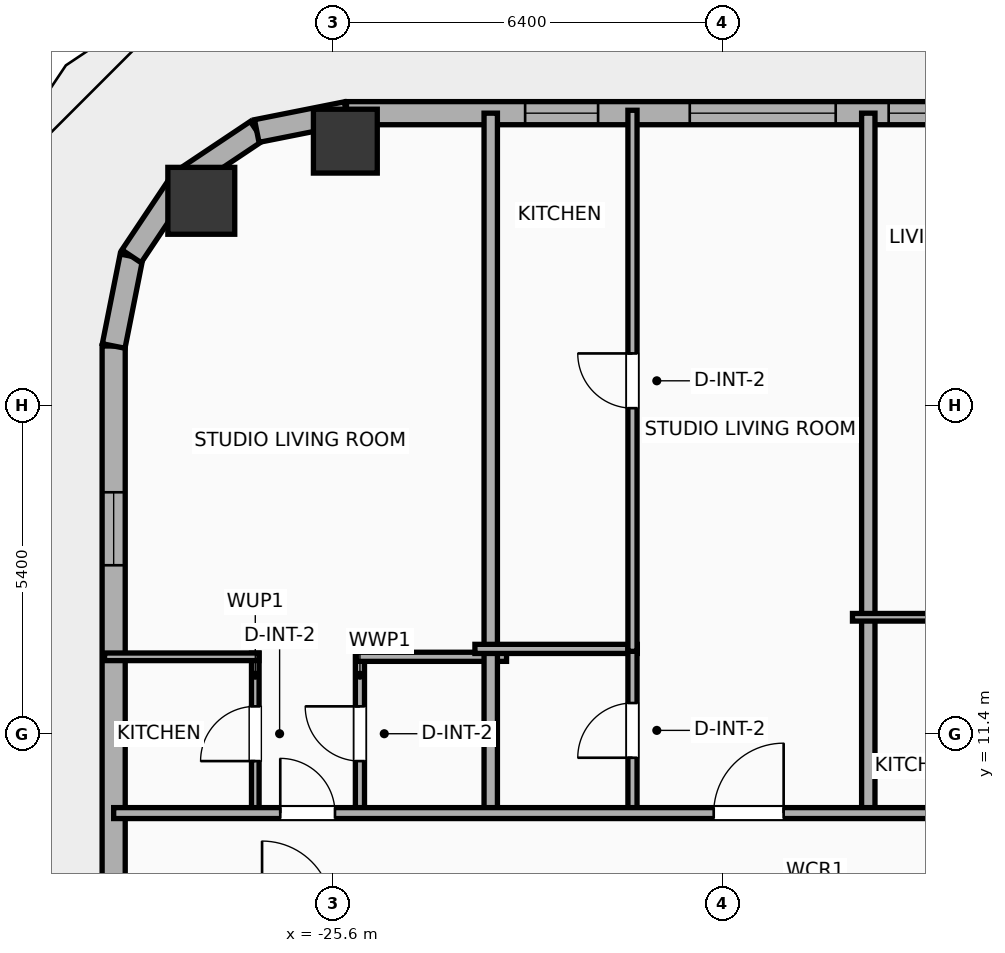
"""IFC4 building model, lengths in metres.
Left out: names, types, materials, properties, quantities, classifications, styles, units other than length and angle.
Written with IfcOpenShell. Run it as: python <this file> out.ifc"""

import sys

from ifc_helpers import new_model, si_unit, direction, frame, frame_2d, origin, origin_2d, place, context, subcontext, project, spatial, rectangle, hollow_rectangle, hollow_circle, extrude, element, fill, save


model = new_model("IFC4")
c1 = context("Model", 3, precision=1e-05, world=origin(), true_north=direction((0.0, 1.0)))
c2 = subcontext(c1, "Body", "Model", "MODEL_VIEW")
j1 = project(units=[si_unit("LENGTHUNIT", "METRE"), si_unit("PLANEANGLEUNIT", "RADIAN")], contexts=[c1])
p1 = place(None, origin())
s1 = spatial("IfcSite", under=j1, at=p1, CompositionType="ELEMENT")
p2 = place(p1, origin())
s2 = spatial("IfcBuilding", under=s1, at=p2, CompositionType="ELEMENT")
p3 = place(p2, frame((0.0, 0.0, 113.1)))
s3 = spatial("IfcBuildingStorey", under=s2, at=p3, CompositionType="ELEMENT", Elevation=113.1)
p4 = place(p3, frame((-25.4, 21.15, 0.0), z_axis=(0.0, 0.0, 1.0), x_axis=(1.0, 0.0, 0.0)))
e1 = element("IfcColumn", 1, at=p4, inside=s3, PredefinedType="COLUMN", context=c2, shape_type="SweptSolid", body=[
    extrude(hollow_rectangle(XDim=1.05, YDim=1.05, WallThickness=0.036, at=origin_2d()), origin(), (0.0, 0.0, 1.0), 3.9),
])
p5 = place(p3, frame((-27.769, 20.169, 0.0), z_axis=(0.0, 0.0, 1.0), x_axis=(1.0, 0.0, 0.0)))
e2 = element("IfcColumn", 2, at=p5, inside=s3, PredefinedType="COLUMN", context=c2, shape_type="SweptSolid", body=[
    extrude(hollow_circle(Radius=0.55, WallThickness=0.036, at=origin_2d()), origin(), (0.0, 0.0, 1.0), 3.9),
])
p6 = place(p3, frame((-29.21, -16.581, 0.0), z_axis=(0.0, 0.0, 1.0), x_axis=(0.0, 1.0, 0.0)))
e3 = element("IfcWall", 3, at=p6, inside=s3, PredefinedType="ELEMENTEDWALL", context=c2, shape_type="SweptSolid", body=[
    extrude(rectangle(XDim=34.363, YDim=0.38, at=frame_2d((17.181, 0.0))), origin(), (0.0, 0.0, 1.0), 3.65),
])
p7 = place(p6, frame((30.757, 0.0, 0.75)))
e4 = element("IfcOpeningElement", 4, at=p7, cuts=e3, PredefinedType="OPENING", context=c2, shape_type="SweptSolid", body=[
    extrude(rectangle(XDim=1.2, YDim=2.05, at=frame_2d((0.6, 1.025))), frame((0.0, 0.2, 0.0), z_axis=(0.0, -1.0, 0.0), x_axis=(1.0, 0.0, 0.0)), (0.0, 0.0, 1.0), 0.4),
])
p8 = place(p6, frame((20.326, 0.0, 0.75)))
e5 = element("IfcOpeningElement", 5, at=p8, cuts=e3, PredefinedType="OPENING", context=c2, shape_type="SweptSolid", body=[
    extrude(rectangle(XDim=1.2, YDim=2.05, at=frame_2d((0.6, 1.025))), frame((0.0, 0.2, 0.0), z_axis=(0.0, -1.0, 0.0), x_axis=(1.0, 0.0, 0.0)), (0.0, 0.0, 1.0), 0.4),
])
p9 = place(p6, frame((11.776, 0.0, 0.75)))
e6 = element("IfcOpeningElement", 6, at=p9, cuts=e3, PredefinedType="OPENING", context=c2, shape_type="SweptSolid", body=[
    extrude(rectangle(XDim=1.2, YDim=2.05, at=frame_2d((0.6, 1.025))), frame((0.0, 0.2, 0.0), z_axis=(0.0, -1.0, 0.0), x_axis=(1.0, 0.0, 0.0)), (0.0, 0.0, 1.0), 0.4),
])
p10 = place(p3, frame((-29.21, 17.781, 0.0), z_axis=(0.0, 0.0, 1.0), x_axis=(0.195086038585, 0.980786132421, 0.0)))
e7 = element("IfcWall", 7, at=p10, inside=s3, PredefinedType="ELEMENTEDWALL", context=c2, shape_type="SweptSolid", body=[
    extrude(rectangle(XDim=1.504, YDim=0.38, at=frame_2d((0.752, 0.0))), origin(), (0.0, 0.0, 1.0), 3.65),
])
p11 = place(p3, frame((-28.917, 19.257, 0.0), z_axis=(0.0, 0.0, 1.0), x_axis=(0.555610286119, 0.831442848281, 0.0)))
e8 = element("IfcWall", 8, at=p11, inside=s3, PredefinedType="ELEMENTEDWALL", context=c2, shape_type="SweptSolid", body=[
    extrude(rectangle(XDim=1.485, YDim=0.38, at=frame_2d((0.743, 0.0))), origin(), (0.0, 0.0, 1.0), 3.65),
])
p12 = place(p3, frame((-28.091, 20.491, 0.0), z_axis=(0.0, 0.0, 1.0), x_axis=(0.831468045563, 0.555572577804, 0.0)))
e9 = element("IfcWall", 9, at=p12, inside=s3, PredefinedType="ELEMENTEDWALL", context=c2, shape_type="SweptSolid", body=[
    extrude(rectangle(XDim=1.485, YDim=0.38, at=frame_2d((0.742, 0.0))), origin(), (0.0, 0.0, 1.0), 3.65),
])
p13 = place(p3, frame((-26.857, 21.316, 0.0), z_axis=(0.0, 0.0, 1.0), x_axis=(0.980755066645, 0.195242155415, 0.0)))
e10 = element("IfcWall", 10, at=p13, inside=s3, PredefinedType="ELEMENTEDWALL", context=c2, shape_type="SweptSolid", body=[
    extrude(rectangle(XDim=1.504, YDim=0.38, at=frame_2d((0.752, 0.0))), origin(), (0.0, 0.0, 1.0), 3.65),
])
p14 = place(p3, frame((-25.381, 21.61, 0.0), z_axis=(0.0, 0.0, 1.0), x_axis=(1.0, 0.0, 0.0)))
e11 = element("IfcWall", 11, at=p14, inside=s3, PredefinedType="ELEMENTEDWALL", context=c2, shape_type="SweptSolid", body=[
    extrude(rectangle(XDim=54.763, YDim=0.38, at=frame_2d((27.381, 0.0))), origin(), (0.0, 0.0, 1.0), 3.65),
])
p15 = place(p14, frame((5.645, 0.0, 0.75)))
e12 = element("IfcOpeningElement", 12, at=p15, cuts=e11, PredefinedType="OPENING", context=c2, shape_type="SweptSolid", body=[
    extrude(rectangle(XDim=2.4, YDim=2.1, at=frame_2d((1.2, 1.05))), frame((0.0, 0.2, 0.0), z_axis=(0.0, -1.0, 0.0), x_axis=(1.0, 0.0, 0.0)), (0.0, 0.0, 1.0), 0.4),
])
p16 = place(p14, frame((34.677, 0.0, 0.75)))
e13 = element("IfcOpeningElement", 13, at=p16, cuts=e11, PredefinedType="OPENING", context=c2, shape_type="SweptSolid", body=[
    extrude(rectangle(XDim=2.4, YDim=2.1, at=frame_2d((1.2, 1.05))), frame((0.0, 0.2, 0.0), z_axis=(0.0, -1.0, 0.0), x_axis=(1.0, 0.0, 0.0)), (0.0, 0.0, 1.0), 0.4),
])
p17 = place(p14, frame((45.067, 0.0, 0.75)))
e14 = element("IfcOpeningElement", 14, at=p17, cuts=e11, PredefinedType="OPENING", context=c2, shape_type="SweptSolid", body=[
    extrude(rectangle(XDim=2.4, YDim=2.1, at=frame_2d((1.2, 1.05))), frame((0.0, 0.2, 0.0), z_axis=(0.0, -1.0, 0.0), x_axis=(1.0, 0.0, 0.0)), (0.0, 0.0, 1.0), 0.4),
])
p18 = place(p14, frame((2.938, 0.0, 0.75)))
e15 = element("IfcOpeningElement", 15, at=p18, cuts=e11, PredefinedType="OPENING", context=c2, shape_type="SweptSolid", body=[
    extrude(rectangle(XDim=1.2, YDim=2.05, at=frame_2d((0.6, 1.025))), frame((0.0, 0.2, 0.0), z_axis=(0.0, -1.0, 0.0), x_axis=(1.0, 0.0, 0.0)), (0.0, 0.0, 1.0), 0.4),
])
p19 = place(p14, frame((8.916, 0.0, 0.75)))
e16 = element("IfcOpeningElement", 16, at=p19, cuts=e11, PredefinedType="OPENING", context=c2, shape_type="SweptSolid", body=[
    extrude(rectangle(XDim=1.2, YDim=2.05, at=frame_2d((0.6, 1.025))), frame((0.0, 0.2, 0.0), z_axis=(0.0, -1.0, 0.0), x_axis=(1.0, 0.0, 0.0)), (0.0, 0.0, 1.0), 0.4),
])
p20 = place(p14, frame((13.476, 0.0, 0.75)))
e17 = element("IfcOpeningElement", 17, at=p20, cuts=e11, PredefinedType="OPENING", context=c2, shape_type="SweptSolid", body=[
    extrude(rectangle(XDim=1.2, YDim=2.05, at=frame_2d((0.6, 1.025))), frame((0.0, 0.2, 0.0), z_axis=(0.0, -1.0, 0.0), x_axis=(1.0, 0.0, 0.0)), (0.0, 0.0, 1.0), 0.4),
])
p21 = place(p14, frame((17.076, 0.0, 0.75)))
e18 = element("IfcOpeningElement", 18, at=p21, cuts=e11, PredefinedType="OPENING", context=c2, shape_type="SweptSolid", body=[
    extrude(rectangle(XDim=1.2, YDim=2.05, at=frame_2d((0.6, 1.025))), frame((0.0, 0.2, 0.0), z_axis=(0.0, -1.0, 0.0), x_axis=(1.0, 0.0, 0.0)), (0.0, 0.0, 1.0), 0.4),
])
p22 = place(p14, frame((19.956, 0.0, 0.75)))
e19 = element("IfcOpeningElement", 19, at=p22, cuts=e11, PredefinedType="OPENING", context=c2, shape_type="SweptSolid", body=[
    extrude(rectangle(XDim=1.2, YDim=2.05, at=frame_2d((0.6, 1.025))), frame((0.0, 0.2, 0.0), z_axis=(0.0, -1.0, 0.0), x_axis=(1.0, 0.0, 0.0)), (0.0, 0.0, 1.0), 0.4),
])
p23 = place(p14, frame((24.276, 0.0, 0.75)))
e20 = element("IfcOpeningElement", 20, at=p23, cuts=e11, PredefinedType="OPENING", context=c2, shape_type="SweptSolid", body=[
    extrude(rectangle(XDim=1.2, YDim=2.05, at=frame_2d((0.6, 1.025))), frame((0.0, 0.2, 0.0), z_axis=(0.0, -1.0, 0.0), x_axis=(1.0, 0.0, 0.0)), (0.0, 0.0, 1.0), 0.4),
])
p24 = place(p14, frame((27.876, 0.0, 0.75)))
e21 = element("IfcOpeningElement", 21, at=p24, cuts=e11, PredefinedType="OPENING", context=c2, shape_type="SweptSolid", body=[
    extrude(rectangle(XDim=1.2, YDim=2.05, at=frame_2d((0.6, 1.025))), frame((0.0, 0.2, 0.0), z_axis=(0.0, -1.0, 0.0), x_axis=(1.0, 0.0, 0.0)), (0.0, 0.0, 1.0), 0.4),
])
p25 = place(p14, frame((30.876, 0.0, 0.75)))
e22 = element("IfcOpeningElement", 22, at=p25, cuts=e11, PredefinedType="OPENING", context=c2, shape_type="SweptSolid", body=[
    extrude(rectangle(XDim=1.2, YDim=2.05, at=frame_2d((0.6, 1.025))), frame((0.0, 0.2, 0.0), z_axis=(0.0, -1.0, 0.0), x_axis=(1.0, 0.0, 0.0)), (0.0, 0.0, 1.0), 0.4),
])
p26 = place(p14, frame((38.676, 0.0, 0.75)))
e23 = element("IfcOpeningElement", 23, at=p26, cuts=e11, PredefinedType="OPENING", context=c2, shape_type="SweptSolid", body=[
    extrude(rectangle(XDim=1.2, YDim=2.05, at=frame_2d((0.6, 1.025))), frame((0.0, 0.2, 0.0), z_axis=(0.0, -1.0, 0.0), x_axis=(1.0, 0.0, 0.0)), (0.0, 0.0, 1.0), 0.4),
])
p27 = place(p14, frame((41.796, 0.0, 0.75)))
e24 = element("IfcOpeningElement", 24, at=p27, cuts=e11, PredefinedType="OPENING", context=c2, shape_type="SweptSolid", body=[
    extrude(rectangle(XDim=1.2, YDim=2.05, at=frame_2d((0.6, 1.025))), frame((0.0, 0.2, 0.0), z_axis=(0.0, -1.0, 0.0), x_axis=(1.0, 0.0, 0.0)), (0.0, 0.0, 1.0), 0.4),
])
p28 = place(p14, frame((49.476, 0.0, 0.75)))
e25 = element("IfcOpeningElement", 25, at=p28, cuts=e11, PredefinedType="OPENING", context=c2, shape_type="SweptSolid", body=[
    extrude(rectangle(XDim=1.2, YDim=2.05, at=frame_2d((0.6, 1.025))), frame((0.0, 0.2, 0.0), z_axis=(0.0, -1.0, 0.0), x_axis=(1.0, 0.0, 0.0)), (0.0, 0.0, 1.0), 0.4),
])
p29 = place(p14, frame((52.227, 0.0, 0.75)))
e26 = element("IfcOpeningElement", 26, at=p29, cuts=e11, PredefinedType="OPENING", context=c2, shape_type="SweptSolid", body=[
    extrude(rectangle(XDim=1.2, YDim=2.05, at=frame_2d((0.6, 1.025))), frame((0.0, 0.2, 0.0), z_axis=(0.0, -1.0, 0.0), x_axis=(1.0, 0.0, 0.0)), (0.0, 0.0, 1.0), 0.4),
])
p30 = place(p3, frame((-26.881, 10.08, 0.0), z_axis=(0.0, 0.0, 1.0), x_axis=(0.0, 1.0, 0.0)))
e27 = element("IfcWall", 27, at=p30, inside=s3, PredefinedType="PARTITIONING", context=c2, shape_type="SweptSolid", body=[
    extrude(rectangle(XDim=2.65, YDim=0.125, at=frame_2d((1.325, 0.0))), origin(), (0.0, 0.0, 1.0), 3.65),
])
p31 = place(p30, frame((0.875, 0.0, 0.0)))
e28 = element("IfcOpeningElement", 28, at=p31, cuts=e27, PredefinedType="OPENING", context=c2, shape_type="SweptSolid", body=[
    extrude(rectangle(XDim=0.9, YDim=2.05, at=frame_2d((0.45, 1.025))), frame((0.0, 0.073, 0.0), z_axis=(0.0, -1.0, 0.0), x_axis=(1.0, 0.0, 0.0)), (0.0, 0.0, 1.0), 0.145),
])
p32 = place(p3, frame((-25.16, 10.08, 0.0), z_axis=(0.0, 0.0, 1.0), x_axis=(0.0, 1.0, 0.0)))
e29 = element("IfcWall", 29, at=p32, inside=s3, PredefinedType="PLUMBINGWALL", context=c2, shape_type="SweptSolid", body=[
    extrude(rectangle(XDim=2.65, YDim=0.15, at=frame_2d((1.325, 0.0))), origin(), (0.0, 0.0, 1.0), 3.65),
])
p33 = place(p32, frame((0.875, 0.0, 0.0)))
e30 = element("IfcOpeningElement", 30, at=p33, cuts=e29, PredefinedType="OPENING", context=c2, shape_type="SweptSolid", body=[
    extrude(rectangle(XDim=0.9, YDim=2.05, at=frame_2d((0.45, 1.025))), frame((0.0, 0.085, 0.0), z_axis=(0.0, -1.0, 0.0), x_axis=(1.0, 0.0, 0.0)), (0.0, 0.0, 1.0), 0.17),
])
p34 = place(p3, frame((-29.36, 12.67, 0.0), z_axis=(0.0, 0.0, 1.0), x_axis=(1.0, 0.0, 0.0)))
e31 = element("IfcWall", 31, at=p34, inside=s3, PredefinedType="PARTITIONING", context=c2, shape_type="SweptSolid", body=[
    extrude(rectangle(XDim=2.539, YDim=0.125, at=frame_2d((1.27, 0.0))), origin(), (0.0, 0.0, 1.0), 3.65),
])
p35 = place(p3, frame((-25.22, 12.67, 0.0), z_axis=(0.0, 0.0, 1.0), x_axis=(1.0, 0.0, 0.0)))
e32 = element("IfcWall", 32, at=p35, inside=s3, PredefinedType="PLUMBINGWALL", context=c2, shape_type="SweptSolid", body=[
    extrude(rectangle(XDim=2.471, YDim=0.15, at=frame_2d((1.235, 0.0))), origin(), (0.0, 0.0, 1.0), 3.65),
])
p36 = place(p3, frame((-23.009, 10.02, 0.0), z_axis=(0.0, 0.0, 1.0), x_axis=(0.0, 1.0, 0.0)))
e33 = element("IfcWall", 33, at=p36, inside=s3, PredefinedType="PARTITIONING", context=c2, shape_type="SweptSolid", body=[
    extrude(rectangle(XDim=11.59, YDim=0.22, at=frame_2d((5.795, 0.0))), origin(), (0.0, 0.0, 1.0), 3.65),
])
p37 = place(p3, frame((-23.269, 12.8, 0.0), z_axis=(0.0, 0.0, 1.0), x_axis=(1.0, 0.0, 0.0)))
e34 = element("IfcWall", 34, at=p37, inside=s3, PredefinedType="PLUMBINGWALL", context=c2, shape_type="SweptSolid", body=[
    extrude(rectangle(XDim=2.671, YDim=0.15, at=frame_2d((1.335, 0.0))), origin(), (0.0, 0.0, 1.0), 3.65),
])
p38 = place(p3, frame((-20.678, 10.08, 0.0), z_axis=(0.0, 0.0, 1.0), x_axis=(0.0, 1.0, 0.0)))
e35 = element("IfcWall", 35, at=p38, inside=s3, PredefinedType="PLUMBINGWALL", context=c2, shape_type="SweptSolid", body=[
    extrude(rectangle(XDim=2.76, YDim=0.15, at=frame_2d((1.38, 0.0))), origin(), (0.0, 0.0, 1.0), 3.65),
])
p39 = place(p38, frame((0.93, 0.0, 0.0)))
e36 = element("IfcOpeningElement", 36, at=p39, cuts=e35, PredefinedType="OPENING", context=c2, shape_type="SweptSolid", body=[
    extrude(rectangle(XDim=0.9, YDim=2.05, at=frame_2d((0.45, 1.025))), frame((0.0, 0.085, 0.0), z_axis=(0.0, -1.0, 0.0), x_axis=(1.0, 0.0, 0.0)), (0.0, 0.0, 1.0), 0.17),
])
p40 = place(p3, frame((-20.678, 12.76, 0.0), z_axis=(0.0, 0.0, 1.0), x_axis=(0.0, 1.0, 0.0)))
e37 = element("IfcWall", 37, at=p40, inside=s3, PredefinedType="PLUMBINGWALL", context=c2, shape_type="SweptSolid", body=[
    extrude(rectangle(XDim=8.898, YDim=0.15, at=frame_2d((4.449, 0.0))), origin(), (0.0, 0.0, 1.0), 3.65),
])
p41 = place(p40, frame((3.999, 0.0, 0.0)))
e38 = element("IfcOpeningElement", 38, at=p41, cuts=e37, PredefinedType="OPENING", context=c2, shape_type="SweptSolid", body=[
    extrude(rectangle(XDim=0.9, YDim=2.05, at=frame_2d((0.45, 1.025))), frame((0.0, 0.085, 0.0), z_axis=(0.0, -1.0, 0.0), x_axis=(1.0, 0.0, 0.0)), (0.0, 0.0, 1.0), 0.17),
])
p42 = place(p3, frame((-16.8, 10.02, 0.0), z_axis=(0.0, 0.0, 1.0), x_axis=(0.0, 1.0, 0.0)))
e39 = element("IfcWall", 39, at=p42, inside=s3, PredefinedType="PARTITIONING", context=c2, shape_type="SweptSolid", body=[
    extrude(rectangle(XDim=11.59, YDim=0.22, at=frame_2d((5.795, 0.0))), origin(), (0.0, 0.0, 1.0), 3.65),
])
p43 = place(p3, frame((-17.06, 13.32, 0.0), z_axis=(0.0, 0.0, 1.0), x_axis=(1.0, 0.0, 0.0)))
e40 = element("IfcWall", 40, at=p43, inside=s3, PredefinedType="PARTITIONING", context=c2, shape_type="SweptSolid", body=[
    extrude(rectangle(XDim=2.69, YDim=0.125, at=frame_2d((1.345, 0.0))), origin(), (0.0, 0.0, 1.0), 3.65),
])
p44 = place(p3, frame((-29.21, 10.1, 0.0), z_axis=(0.0, 0.0, 1.0), x_axis=(1.0, 0.0, 0.0)))
e41 = element("IfcWall", 41, at=p44, inside=s3, PredefinedType="PARTITIONING", context=c2, shape_type="SweptSolid", body=[
    extrude(rectangle(XDim=62.42, YDim=0.18, at=frame_2d((31.21, 0.0))), origin(), (0.0, 0.0, 1.0), 3.65),
])
p45 = place(p44, frame((2.74, 0.0, 0.0)))
e42 = element("IfcOpeningElement", 42, at=p45, cuts=e41, PredefinedType="OPENING", context=c2, shape_type="SweptSolid", body=[
    extrude(rectangle(XDim=0.9, YDim=2.05, at=frame_2d((0.45, 1.025))), frame((0.0, 0.1, 0.0), z_axis=(0.0, -1.0, 0.0), x_axis=(1.0, 0.0, 0.0)), (0.0, 0.0, 1.0), 0.2),
])
p46 = place(p44, frame((9.868, 0.0, 0.0)))
e43 = element("IfcOpeningElement", 43, at=p46, cuts=e41, PredefinedType="OPENING", context=c2, shape_type="SweptSolid", body=[
    extrude(rectangle(XDim=1.15, YDim=2.05, at=frame_2d((0.575, 1.025))), frame((0.0, 0.1, 0.0), z_axis=(0.0, -1.0, 0.0), x_axis=(1.0, 0.0, 0.0)), (0.0, 0.0, 1.0), 0.2),
])
p47 = place(p44, frame((15.598, 0.0, 0.0)))
e44 = element("IfcOpeningElement", 44, at=p47, cuts=e41, PredefinedType="OPENING", context=c2, shape_type="SweptSolid", body=[
    extrude(rectangle(XDim=1.15, YDim=2.05, at=frame_2d((0.575, 1.025))), frame((0.0, 0.1, 0.0), z_axis=(0.0, -1.0, 0.0), x_axis=(1.0, 0.0, 0.0)), (0.0, 0.0, 1.0), 0.2),
])
p48 = place(p44, frame((22.801, 0.0, 0.0)))
e45 = element("IfcOpeningElement", 45, at=p48, cuts=e41, PredefinedType="OPENING", context=c2, shape_type="SweptSolid", body=[
    extrude(rectangle(XDim=1.15, YDim=2.05, at=frame_2d((0.575, 1.025))), frame((0.0, 0.1, 0.0), z_axis=(0.0, -1.0, 0.0), x_axis=(1.0, 0.0, 0.0)), (0.0, 0.0, 1.0), 0.2),
])
p49 = place(p44, frame((29.998, 0.0, 0.0)))
e46 = element("IfcOpeningElement", 46, at=p49, cuts=e41, PredefinedType="OPENING", context=c2, shape_type="SweptSolid", body=[
    extrude(rectangle(XDim=1.15, YDim=2.05, at=frame_2d((0.575, 1.025))), frame((0.0, 0.1, 0.0), z_axis=(0.0, -1.0, 0.0), x_axis=(1.0, 0.0, 0.0)), (0.0, 0.0, 1.0), 0.2),
])
p50 = place(p44, frame((37.202, 0.0, 0.0)))
e47 = element("IfcOpeningElement", 47, at=p50, cuts=e41, PredefinedType="OPENING", context=c2, shape_type="SweptSolid", body=[
    extrude(rectangle(XDim=1.15, YDim=2.05, at=frame_2d((0.575, 1.025))), frame((0.0, 0.1, 0.0), z_axis=(0.0, -1.0, 0.0), x_axis=(1.0, 0.0, 0.0)), (0.0, 0.0, 1.0), 0.2),
])
p51 = place(p44, frame((44.399, 0.0, 0.0)))
e48 = element("IfcOpeningElement", 48, at=p51, cuts=e41, PredefinedType="OPENING", context=c2, shape_type="SweptSolid", body=[
    extrude(rectangle(XDim=1.15, YDim=2.05, at=frame_2d((0.575, 1.025))), frame((0.0, 0.1, 0.0), z_axis=(0.0, -1.0, 0.0), x_axis=(1.0, 0.0, 0.0)), (0.0, 0.0, 1.0), 0.2),
])
p52 = place(p44, frame((51.602, 0.0, 0.0)))
e49 = element("IfcOpeningElement", 49, at=p52, cuts=e41, PredefinedType="OPENING", context=c2, shape_type="SweptSolid", body=[
    extrude(rectangle(XDim=1.15, YDim=2.05, at=frame_2d((0.575, 1.025))), frame((0.0, 0.1, 0.0), z_axis=(0.0, -1.0, 0.0), x_axis=(1.0, 0.0, 0.0)), (0.0, 0.0, 1.0), 0.2),
])
p53 = place(p44, frame((58.762, 0.0, 0.0)))
e50 = element("IfcOpeningElement", 50, at=p53, cuts=e41, PredefinedType="OPENING", context=c2, shape_type="SweptSolid", body=[
    extrude(rectangle(XDim=0.9, YDim=2.05, at=frame_2d((0.45, 1.025))), frame((0.0, 0.1, 0.0), z_axis=(0.0, -1.0, 0.0), x_axis=(1.0, 0.0, 0.0)), (0.0, 0.0, 1.0), 0.2),
])
p54 = place(p15, origin())
e51 = element("IfcWindow", 51, at=p54, inside=s3, PartitioningType="SINGLE_PANEL", PredefinedType="WINDOW", context=c2, shape_type="SweptSolid", body=[
    extrude(rectangle(XDim=2.4, YDim=2.1, at=frame_2d((1.2, 1.05))), frame((0.0, 0.03, 0.0), z_axis=(0.0, -1.0, 0.0), x_axis=(1.0, 0.0, 0.0)), (0.0, 0.0, 1.0), 0.06),
])
fill(e12, e51)
p55 = place(p7, origin())
e52 = element("IfcWindow", 52, at=p55, inside=s3, PartitioningType="SINGLE_PANEL", PredefinedType="WINDOW", context=c2, shape_type="SweptSolid", body=[
    extrude(rectangle(XDim=1.2, YDim=2.05, at=frame_2d((0.6, 1.025))), frame((0.0, 0.03, 0.0), z_axis=(0.0, -1.0, 0.0), x_axis=(1.0, 0.0, 0.0)), (0.0, 0.0, 1.0), 0.06),
])
fill(e4, e52)
p56 = place(p18, origin())
e53 = element("IfcWindow", 53, at=p56, inside=s3, PartitioningType="SINGLE_PANEL", PredefinedType="WINDOW", context=c2, shape_type="SweptSolid", body=[
    extrude(rectangle(XDim=1.2, YDim=2.05, at=frame_2d((0.6, 1.025))), frame((0.0, 0.03, 0.0), z_axis=(0.0, -1.0, 0.0), x_axis=(1.0, 0.0, 0.0)), (0.0, 0.0, 1.0), 0.06),
])
fill(e15, e53)
p57 = place(p19, origin())
e54 = element("IfcWindow", 54, at=p57, inside=s3, PartitioningType="SINGLE_PANEL", PredefinedType="WINDOW", context=c2, shape_type="SweptSolid", body=[
    extrude(rectangle(XDim=1.2, YDim=2.05, at=frame_2d((0.6, 1.025))), frame((0.0, 0.03, 0.0), z_axis=(0.0, -1.0, 0.0), x_axis=(1.0, 0.0, 0.0)), (0.0, 0.0, 1.0), 0.06),
])
fill(e16, e54)
p58 = place(p31, origin())
e55 = element("IfcDoor", 55, at=p58, inside=s3, OperationType="SINGLE_SWING_LEFT", PredefinedType="DOOR", context=c2, shape_type="SweptSolid", body=[
    extrude(rectangle(XDim=0.9, YDim=2.05, at=frame_2d((0.45, 1.025))), frame((0.0, 0.025, 0.0), z_axis=(0.0, -1.0, 0.0), x_axis=(1.0, 0.0, 0.0)), (0.0, 0.0, 1.0), 0.05),
])
fill(e28, e55)
p59 = place(p33, origin())
e56 = element("IfcDoor", 56, at=p59, inside=s3, OperationType="SINGLE_SWING_RIGHT", PredefinedType="DOOR", context=c2, shape_type="SweptSolid", body=[
    extrude(rectangle(XDim=0.9, YDim=2.05, at=frame_2d((0.45, 1.025))), frame((0.0, 0.025, 0.0), z_axis=(0.0, -1.0, 0.0), x_axis=(1.0, 0.0, 0.0)), (0.0, 0.0, 1.0), 0.05),
])
fill(e30, e56)
p60 = place(p39, origin())
e57 = element("IfcDoor", 57, at=p60, inside=s3, OperationType="SINGLE_SWING_LEFT", PredefinedType="DOOR", context=c2, shape_type="SweptSolid", body=[
    extrude(rectangle(XDim=0.9, YDim=2.05, at=frame_2d((0.45, 1.025))), frame((0.0, 0.025, 0.0), z_axis=(0.0, -1.0, 0.0), x_axis=(1.0, 0.0, 0.0)), (0.0, 0.0, 1.0), 0.05),
])
fill(e36, e57)
p61 = place(p41, origin())
e58 = element("IfcDoor", 58, at=p61, inside=s3, OperationType="SINGLE_SWING_RIGHT", PredefinedType="DOOR", context=c2, shape_type="SweptSolid", body=[
    extrude(rectangle(XDim=0.9, YDim=2.05, at=frame_2d((0.45, 1.025))), frame((0.0, 0.025, 0.0), z_axis=(0.0, -1.0, 0.0), x_axis=(1.0, 0.0, 0.0)), (0.0, 0.0, 1.0), 0.05),
])
fill(e38, e58)
p62 = place(p45, origin())
e59 = element("IfcDoor", 59, at=p62, inside=s3, OperationType="SINGLE_SWING_LEFT", PredefinedType="DOOR", context=c2, shape_type="SweptSolid", body=[
    extrude(rectangle(XDim=0.9, YDim=2.05, at=frame_2d((0.45, 1.025))), frame((0.0, 0.025, 0.0), z_axis=(0.0, -1.0, 0.0), x_axis=(1.0, 0.0, 0.0)), (0.0, 0.0, 1.0), 0.05),
])
fill(e42, e59)
p63 = place(p46, origin())
e60 = element("IfcDoor", 60, at=p63, inside=s3, OperationType="SINGLE_SWING_RIGHT", PredefinedType="DOOR", context=c2, shape_type="SweptSolid", body=[
    extrude(rectangle(XDim=1.15, YDim=2.05, at=frame_2d((0.575, 1.025))), frame((0.0, 0.025, 0.0), z_axis=(0.0, -1.0, 0.0), x_axis=(1.0, 0.0, 0.0)), (0.0, 0.0, 1.0), 0.05),
])
fill(e43, e60)
save(model, sys.argv[1])
